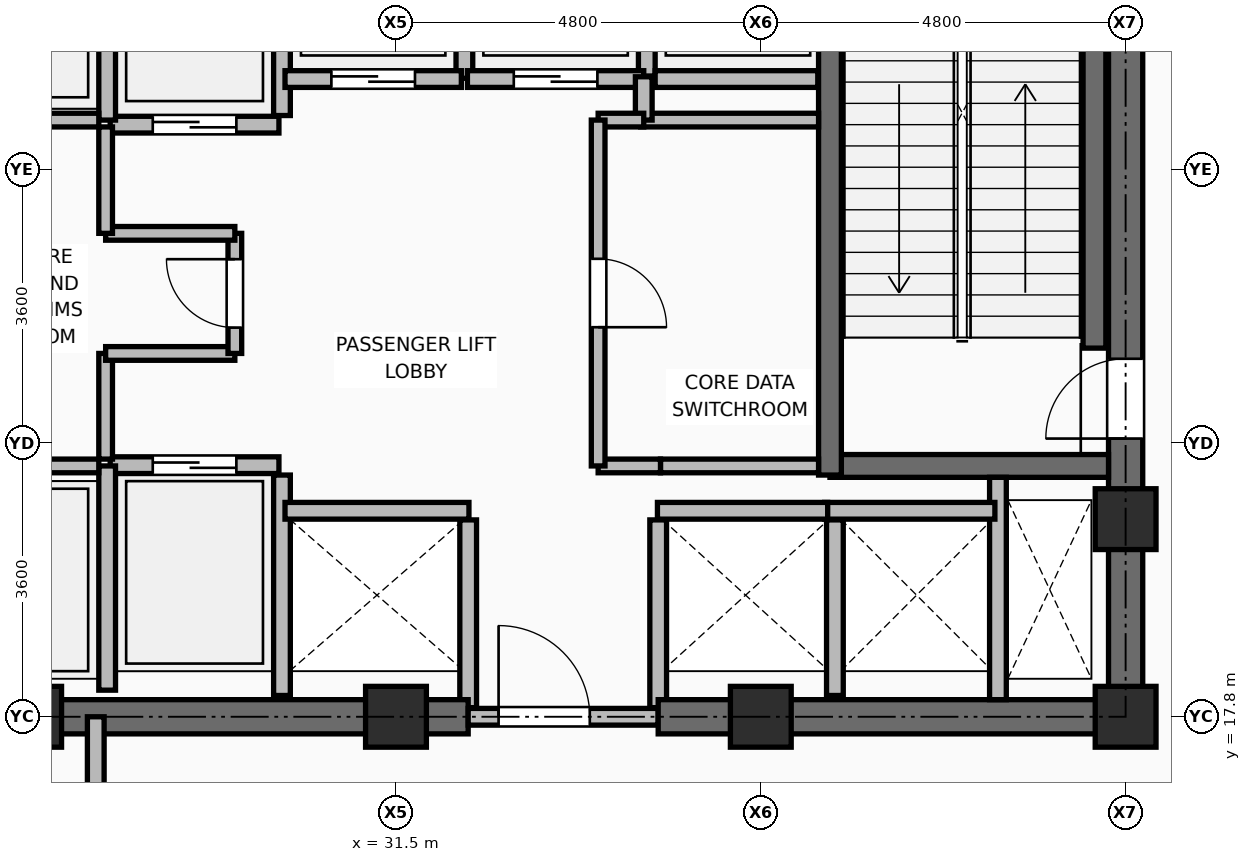
"""IFC4 building model, lengths in metres.
Left out: names, types, materials, properties, quantities, classifications, styles, units other than length and angle.
Written with IfcOpenShell. Run it as: python <this file> out.ifc"""

import sys

from ifc_helpers import new_model, si_unit, direction, frame, frame_2d, origin, origin_2d, place, context, subcontext, project, spatial, rectangle, extrude, element, fill, save


model = new_model("IFC4")
c1 = context("Model", 3, precision=1e-05, world=origin(), true_north=direction((0.0, 1.0)))
c2 = subcontext(c1, "Body", "Model", "MODEL_VIEW")
j1 = project(units=[si_unit("LENGTHUNIT", "METRE"), si_unit("PLANEANGLEUNIT", "RADIAN")], contexts=[c1])
p1 = place(None, origin())
s1 = spatial("IfcSite", under=j1, at=p1, CompositionType="ELEMENT")
p2 = place(p1, origin())
s2 = spatial("IfcBuilding", under=s1, at=p2, CompositionType="ELEMENT")
p3 = place(p2, frame((0.0, 0.0, 253.65)))
s3 = spatial("IfcBuildingStorey", under=s2, at=p3, CompositionType="ELEMENT", Elevation=253.65)
for number, where, z_axis, x_axis in (
    (1, (26.7, 17.8, 0.0), (0.0, 0.0, 1.0), (1.0, 0.0, 0.0)),
    (2, (31.5, 17.8, 0.0), (0.0, 0.0, 1.0), (1.0, 0.0, 0.0)),
    (3, (36.3, 17.8, 0.0), (0.0, 0.0, 1.0), (1.0, 0.0, 0.0)),
    (4, (41.1, 17.8, 0.0), (0.0, 0.0, 1.0), (1.0, 0.0, 0.0)),
    (5, (41.1, 20.4, 0.0), (0.0, 0.0, 1.0), (1.0, 0.0, 0.0)),
):
    element("IfcColumn", number, at=place(p3, frame(where, z_axis=z_axis, x_axis=x_axis)), inside=s3, PredefinedType="COLUMN", context=c2, shape_type="SweptSolid", body=[
        extrude(rectangle(XDim=0.8, YDim=0.8, at=origin_2d()), origin(), (0.0, 0.0, 1.0), 5.4),
    ])
p4 = place(p3, frame((30.0, 18.08, 0.0), z_axis=(0.0, 0.0, 1.0), x_axis=(0.0, 1.0, 0.0)))
e6 = element("IfcWall", 6, at=p4, inside=s3, PredefinedType="PARTITIONING", context=c2, shape_type="SweptSolid", body=[
    extrude(rectangle(XDim=2.9, YDim=0.22, at=frame_2d((1.45, 0.0))), origin(), (0.0, 0.0, 1.0), 5.195),
])
for number, where, z_axis, x_axis in (
    (7, (32.45, 17.92, 0.0), (0.0, 0.0, 1.0), (0.0, 1.0, 0.0)),
    (8, (34.95, 17.92, 0.0), (0.0, 0.0, 1.0), (0.0, 1.0, 0.0)),
):
    element("IfcWall", number, at=place(p3, frame(where, z_axis=z_axis, x_axis=x_axis)), inside=s3, PredefinedType="PARTITIONING", context=c2, shape_type="SweptSolid", body=[
        extrude(rectangle(XDim=2.47, YDim=0.22, at=frame_2d((1.235, 0.0))), origin(), (0.0, 0.0, 1.0), 5.195),
    ])
p5 = place(p3, frame((37.275, 18.08, 0.0), z_axis=(0.0, 0.0, 1.0), x_axis=(0.0, 1.0, 0.0)))
e9 = element("IfcWall", 9, at=p5, inside=s3, PredefinedType="PARTITIONING", context=c2, shape_type="SweptSolid", body=[
    extrude(rectangle(XDim=2.31, YDim=0.22, at=frame_2d((1.155, 0.0))), origin(), (0.0, 0.0, 1.0), 5.195),
])
p6 = place(p3, frame((30.0, 25.71, 0.0), z_axis=(0.0, 0.0, 1.0), x_axis=(0.0, 1.0, 0.0)))
e10 = element("IfcWall", 10, at=p6, inside=s3, PredefinedType="PARTITIONING", context=c2, shape_type="SweptSolid", body=[
    extrude(rectangle(XDim=2.73, YDim=0.22, at=frame_2d((1.365, 0.0))), origin(), (0.0, 0.0, 1.0), 5.195),
])
p7 = place(p3, frame((32.4, 26.2, 0.0), z_axis=(0.0, 0.0, 1.0), x_axis=(0.0, 1.0, 0.0)))
e11 = element("IfcWall", 11, at=p7, inside=s3, PredefinedType="PARTITIONING", context=c2, shape_type="SweptSolid", body=[
    extrude(rectangle(XDim=2.24, YDim=0.22, at=frame_2d((1.12, 0.0))), origin(), (0.0, 0.0, 1.0), 5.195),
])
p8 = place(p3, frame((34.8, 26.23, 0.0), z_axis=(0.0, 0.0, 1.0), x_axis=(0.0, 1.0, 0.0)))
e12 = element("IfcWall", 12, at=p8, inside=s3, PredefinedType="PARTITIONING", context=c2, shape_type="SweptSolid", body=[
    extrude(rectangle(XDim=2.21, YDim=0.22, at=frame_2d((1.105, 0.0))), origin(), (0.0, 0.0, 1.0), 5.195),
])
p9 = place(p3, frame((34.91, 26.19, 0.0), z_axis=(0.0, 0.0, 1.0), x_axis=(1.0, 0.0, 0.0)))
e13 = element("IfcWall", 13, at=p9, inside=s3, PredefinedType="PARTITIONING", context=c2, shape_type="SweptSolid", body=[
    extrude(rectangle(XDim=2.14, YDim=0.22, at=frame_2d((1.07, 0.0))), origin(), (0.0, 0.0, 1.0), 5.195),
])
p10 = place(p3, frame((25.55, 17.8, 0.0), z_axis=(0.0, 0.0, 1.0), x_axis=(1.0, 0.0, 0.0)))
e14 = element("IfcWall", 14, at=p10, inside=s3, PredefinedType="SHEAR", context=c2, shape_type="SweptSolid", body=[
    extrude(rectangle(XDim=6.9, YDim=0.45, at=frame_2d((3.45, 0.0))), origin(), (0.0, 0.0, 1.0), 5.22),
])
p11 = place(p3, frame((32.45, 17.8, 0.0), z_axis=(0.0, 0.0, 1.0), x_axis=(1.0, 0.0, 0.0)))
e15 = element("IfcWall", 15, at=p11, inside=s3, PredefinedType="PARTITIONING", context=c2, shape_type="SweptSolid", body=[
    extrude(rectangle(XDim=2.5, YDim=0.22, at=frame_2d((1.25, 0.0))), origin(), (0.0, 0.0, 1.0), 4.733),
])
p12 = place(p11, frame((0.4, 0.0, 0.0)))
e16 = element("IfcOpeningElement", 16, at=p12, cuts=e15, PredefinedType="OPENING", context=c2, shape_type="SweptSolid", body=[
    extrude(rectangle(XDim=1.2, YDim=2.1, at=frame_2d((0.6, 1.05))), frame((0.0, 0.12, 0.0), z_axis=(0.0, -1.0, 0.0), x_axis=(1.0, 0.0, 0.0)), (0.0, 0.0, 1.0), 0.24),
])
p13 = place(p3, frame((34.95, 17.8, 0.0), z_axis=(0.0, 0.0, 1.0), x_axis=(1.0, 0.0, 0.0)))
e17 = element("IfcWall", 17, at=p13, inside=s3, PredefinedType="SHEAR", context=c2, shape_type="SweptSolid", body=[
    extrude(rectangle(XDim=6.375, YDim=0.45, at=frame_2d((3.188, 0.0))), origin(), (0.0, 0.0, 1.0), 5.22),
])
p14 = place(p3, frame((41.1, 18.025, 0.0), z_axis=(0.0, 0.0, 1.0), x_axis=(0.0, 1.0, 0.0)))
e18 = element("IfcWall", 18, at=p14, inside=s3, PredefinedType="SHEAR", context=c2, shape_type="SweptSolid", body=[
    extrude(rectangle(XDim=14.2, YDim=0.45, at=frame_2d((7.1, 0.0))), origin(), (0.0, 0.0, 1.0), 5.22),
])
p15 = place(p14, frame((3.435, 0.0, 0.0)))
e19 = element("IfcOpeningElement", 19, at=p15, cuts=e18, PredefinedType="OPENING", context=c2, shape_type="SweptSolid", body=[
    extrude(rectangle(XDim=1.05, YDim=2.1, at=frame_2d((0.525, 1.05))), frame((0.0, 0.235, 0.0), z_axis=(0.0, -1.0, 0.0), x_axis=(1.0, 0.0, 0.0)), (0.0, 0.0, 1.0), 0.47),
])
p16 = place(p3, frame((37.21, 21.1, 0.0), z_axis=(0.0, 0.0, 1.0), x_axis=(1.0, 0.0, 0.0)))
e20 = element("IfcWall", 20, at=p16, inside=s3, PredefinedType="SHEAR", context=c2, shape_type="SweptSolid", body=[
    extrude(rectangle(XDim=3.665, YDim=0.3, at=frame_2d((1.833, 0.0))), origin(), (0.0, 0.0, 1.0), 5.22),
])
p17 = place(p3, frame((37.21, 20.98, 0.0), z_axis=(0.0, 0.0, 1.0), x_axis=(0.0, 1.0, 0.0)))
e21 = element("IfcWall", 21, at=p17, inside=s3, PredefinedType="SHEAR", context=c2, shape_type="SweptSolid", body=[
    extrude(rectangle(XDim=7.99, YDim=0.3, at=frame_2d((3.995, 0.0))), origin(), (0.0, 0.0, 1.0), 5.22),
])
p18 = place(p3, frame((40.69, 22.65, 0.0), z_axis=(0.0, 0.0, 1.0), x_axis=(0.0, 1.0, 0.0)))
e22 = element("IfcWall", 22, at=p18, inside=s3, PredefinedType="SHEAR", context=c2, shape_type="SweptSolid", body=[
    extrude(rectangle(XDim=6.2, YDim=0.3, at=frame_2d((3.1, 0.0))), origin(), (0.0, 0.0, 1.0), 5.22),
])
p19 = place(p3, frame((39.42, 18.025, 0.0), z_axis=(0.0, 0.0, 1.0), x_axis=(0.0, 1.0, 0.0)))
e23 = element("IfcWall", 23, at=p19, inside=s3, PredefinedType="PARTITIONING", context=c2, shape_type="SweptSolid", body=[
    extrude(rectangle(XDim=2.925, YDim=0.22, at=frame_2d((1.462, 0.0))), origin(), (0.0, 0.0, 1.0), 5.2),
])
p20 = place(p3, frame((27.74, 21.11, 0.0), z_axis=(0.0, 0.0, 1.0), x_axis=(1.0, 0.0, 0.0)))
e24 = element("IfcWall", 24, at=p20, inside=s3, PredefinedType="PARTITIONING", context=c2, shape_type="SweptSolid", body=[
    extrude(rectangle(XDim=2.22, YDim=0.22, at=frame_2d((1.11, 0.0))), origin(), (0.0, 0.0, 1.0), 5.2),
])
p21 = place(p20, frame((0.56, 0.0, 0.0)))
e25 = element("IfcOpeningElement", 25, at=p21, cuts=e24, PredefinedType="OPENING", context=c2, shape_type="SweptSolid", body=[
    extrude(rectangle(XDim=1.1, YDim=2.2, at=frame_2d((0.55, 1.1))), frame((0.0, 0.12, 0.0), z_axis=(0.0, -1.0, 0.0), x_axis=(1.0, 0.0, 0.0)), (0.0, 0.0, 1.0), 0.24),
])
p22 = place(p3, frame((27.74, 25.59, 0.0), z_axis=(0.0, 0.0, 1.0), x_axis=(1.0, 0.0, 0.0)))
e26 = element("IfcWall", 26, at=p22, inside=s3, PredefinedType="PARTITIONING", context=c2, shape_type="SweptSolid", body=[
    extrude(rectangle(XDim=2.22, YDim=0.22, at=frame_2d((1.11, 0.0))), origin(), (0.0, 0.0, 1.0), 5.2),
])
p23 = place(p22, frame((0.56, 0.0, 0.0)))
e27 = element("IfcOpeningElement", 27, at=p23, cuts=e26, PredefinedType="OPENING", context=c2, shape_type="SweptSolid", body=[
    extrude(rectangle(XDim=1.1, YDim=2.2, at=frame_2d((0.55, 1.1))), frame((0.0, 0.12, 0.0), z_axis=(0.0, -1.0, 0.0), x_axis=(1.0, 0.0, 0.0)), (0.0, 0.0, 1.0), 0.24),
])
p24 = place(p3, frame((30.04, 20.51, 0.0), z_axis=(0.0, 0.0, 1.0), x_axis=(1.0, 0.0, 0.0)))
e28 = element("IfcWall", 28, at=p24, inside=s3, PredefinedType="PARTITIONING", context=c2, shape_type="SweptSolid", body=[
    extrude(rectangle(XDim=2.42, YDim=0.22, at=frame_2d((1.21, 0.0))), origin(), (0.0, 0.0, 1.0), 5.2),
])
for number, where, z_axis, x_axis in (
    (29, (37.14, 20.51, 0.0), (0.0, 0.0, 1.0), (1.0, 0.0, 0.0)),
    (30, (34.94, 20.51, 0.0), (0.0, 0.0, 1.0), (1.0, 0.0, 0.0)),
):
    element("IfcWall", number, at=place(p3, frame(where, z_axis=z_axis, x_axis=x_axis)), inside=s3, PredefinedType="PARTITIONING", context=c2, shape_type="SweptSolid", body=[
        extrude(rectangle(XDim=2.24, YDim=0.22, at=frame_2d((1.12, 0.0))), origin(), (0.0, 0.0, 1.0), 5.2),
    ])
p25 = place(p3, frame((30.04, 26.19, 0.0), z_axis=(0.0, 0.0, 1.0), x_axis=(1.0, 0.0, 0.0)))
e31 = element("IfcWall", 31, at=p25, inside=s3, PredefinedType="PARTITIONING", context=c2, shape_type="SweptSolid", body=[
    extrude(rectangle(XDim=2.32, YDim=0.22, at=frame_2d((1.16, 0.0))), origin(), (0.0, 0.0, 1.0), 5.2),
])
p26 = place(p25, frame((0.61, 0.0, 0.0)))
e32 = element("IfcOpeningElement", 32, at=p26, cuts=e31, PredefinedType="OPENING", context=c2, shape_type="SweptSolid", body=[
    extrude(rectangle(XDim=1.1, YDim=2.2, at=frame_2d((0.55, 1.1))), frame((0.0, 0.12, 0.0), z_axis=(0.0, -1.0, 0.0), x_axis=(1.0, 0.0, 0.0)), (0.0, 0.0, 1.0), 0.24),
])
p27 = place(p3, frame((32.44, 26.19, 0.0), z_axis=(0.0, 0.0, 1.0), x_axis=(1.0, 0.0, 0.0)))
e33 = element("IfcWall", 33, at=p27, inside=s3, PredefinedType="PARTITIONING", context=c2, shape_type="SweptSolid", body=[
    extrude(rectangle(XDim=2.32, YDim=0.22, at=frame_2d((1.16, 0.0))), origin(), (0.0, 0.0, 1.0), 5.2),
])
p28 = place(p27, frame((0.61, 0.0, 0.0)))
e34 = element("IfcOpeningElement", 34, at=p28, cuts=e33, PredefinedType="OPENING", context=c2, shape_type="SweptSolid", body=[
    extrude(rectangle(XDim=1.1, YDim=2.2, at=frame_2d((0.55, 1.1))), frame((0.0, 0.12, 0.0), z_axis=(0.0, -1.0, 0.0), x_axis=(1.0, 0.0, 0.0)), (0.0, 0.0, 1.0), 0.24),
])
p29 = place(p3, frame((27.7, 18.15, 0.0), z_axis=(0.0, 0.0, 1.0), x_axis=(0.0, 1.0, 0.0)))
e35 = element("IfcWall", 35, at=p29, inside=s3, PredefinedType="PARTITIONING", context=c2, shape_type="SweptSolid", body=[
    extrude(rectangle(XDim=2.95, YDim=0.22, at=frame_2d((1.475, 0.0))), origin(), (0.0, 0.0, 1.0), 5.2),
])
p30 = place(p3, frame((27.7, 25.65, 0.0), z_axis=(0.0, 0.0, 1.0), x_axis=(0.0, 1.0, 0.0)))
e36 = element("IfcWall", 36, at=p30, inside=s3, PredefinedType="PARTITIONING", context=c2, shape_type="SweptSolid", body=[
    extrude(rectangle(XDim=3.0, YDim=0.22, at=frame_2d((1.5, 0.0))), origin(), (0.0, 0.0, 1.0), 5.2),
])
for number, where, z_axis, x_axis in (
    (37, (25.89, 21.1, 0.0), (0.0, 0.0, 1.0), (1.0, 0.0, 0.0)),
    (38, (25.89, 25.65, 0.0), (0.0, 0.0, 1.0), (1.0, 0.0, 0.0)),
):
    element("IfcWall", number, at=place(p3, frame(where, z_axis=z_axis, x_axis=x_axis)), inside=s3, PredefinedType="PARTITIONING", context=c2, shape_type="SweptSolid", body=[
        extrude(rectangle(XDim=1.7, YDim=0.18, at=frame_2d((0.85, 0.0))), origin(), (0.0, 0.0, 1.0), 5.2),
    ])
p31 = place(p3, frame((27.68, 21.19, 0.0), z_axis=(0.0, 0.0, 1.0), x_axis=(0.0, 1.0, 0.0)))
e39 = element("IfcWall", 39, at=p31, inside=s3, PredefinedType="PARTITIONING", context=c2, shape_type="SweptSolid", body=[
    extrude(rectangle(XDim=1.39, YDim=0.18, at=frame_2d((0.695, 0.0))), origin(), (0.0, 0.0, 1.0), 5.2),
])
p32 = place(p3, frame((27.68, 22.58, 0.0), z_axis=(0.0, 0.0, 1.0), x_axis=(1.0, 0.0, 0.0)))
e40 = element("IfcWall", 40, at=p32, inside=s3, PredefinedType="PARTITIONING", context=c2, shape_type="SweptSolid", body=[
    extrude(rectangle(XDim=1.7, YDim=0.18, at=frame_2d((0.85, 0.0))), origin(), (0.0, 0.0, 1.0), 5.2),
])
p33 = place(p3, frame((29.38, 22.58, 0.0), z_axis=(0.0, 0.0, 1.0), x_axis=(0.0, 1.0, 0.0)))
e41 = element("IfcWall", 41, at=p33, inside=s3, PredefinedType="PARTITIONING", context=c2, shape_type="SweptSolid", body=[
    extrude(rectangle(XDim=1.58, YDim=0.18, at=frame_2d((0.79, 0.0))), origin(), (0.0, 0.0, 1.0), 5.2),
])
p34 = place(p33, frame((0.34, 0.0, 0.0)))
e42 = element("IfcOpeningElement", 42, at=p34, cuts=e41, PredefinedType="OPENING", context=c2, shape_type="SweptSolid", body=[
    extrude(rectangle(XDim=0.9, YDim=2.1, at=frame_2d((0.45, 1.05))), frame((0.0, 0.1, 0.0), z_axis=(0.0, -1.0, 0.0), x_axis=(1.0, 0.0, 0.0)), (0.0, 0.0, 1.0), 0.2),
])
p35 = place(p3, frame((27.68, 24.16, 0.0), z_axis=(0.0, 0.0, 1.0), x_axis=(1.0, 0.0, 0.0)))
e43 = element("IfcWall", 43, at=p35, inside=s3, PredefinedType="PARTITIONING", context=c2, shape_type="SweptSolid", body=[
    extrude(rectangle(XDim=1.7, YDim=0.18, at=frame_2d((0.85, 0.0))), origin(), (0.0, 0.0, 1.0), 5.2),
])
p36 = place(p3, frame((27.68, 24.16, 0.0), z_axis=(0.0, 0.0, 1.0), x_axis=(0.0, 1.0, 0.0)))
e44 = element("IfcWall", 44, at=p36, inside=s3, PredefinedType="PARTITIONING", context=c2, shape_type="SweptSolid", body=[
    extrude(rectangle(XDim=1.4, YDim=0.18, at=frame_2d((0.7, 0.0))), origin(), (0.0, 0.0, 1.0), 5.2),
])
p37 = place(p3, frame((34.98, 21.1, 0.0), z_axis=(0.0, 0.0, 1.0), x_axis=(1.0, 0.0, 0.0)))
e45 = element("IfcWall", 45, at=p37, inside=s3, PredefinedType="PARTITIONING", context=c2, shape_type="SweptSolid", body=[
    extrude(rectangle(XDim=2.08, YDim=0.18, at=frame_2d((1.04, 0.0))), origin(), (0.0, 0.0, 1.0), 5.2),
])
p38 = place(p3, frame((34.72, 25.65, 0.0), z_axis=(0.0, 0.0, 1.0), x_axis=(1.0, 0.0, 0.0)))
e46 = element("IfcWall", 46, at=p38, inside=s3, PredefinedType="PARTITIONING", context=c2, shape_type="SweptSolid", body=[
    extrude(rectangle(XDim=2.34, YDim=0.18, at=frame_2d((1.17, 0.0))), origin(), (0.0, 0.0, 1.0), 5.2),
])
p39 = place(p3, frame((34.76, 25.65, 0.0), z_axis=(0.0, 0.0, 1.0), x_axis=(0.0, 1.0, 0.0)))
e47 = element("IfcWall", 47, at=p39, inside=s3, PredefinedType="PARTITIONING", context=c2, shape_type="SweptSolid", body=[
    extrude(rectangle(XDim=0.57, YDim=0.22, at=frame_2d((0.285, 0.0))), origin(), (0.0, 0.0, 1.0), 5.2),
])
p40 = place(p3, frame((34.16, 21.1, 0.0), z_axis=(0.0, 0.0, 1.0), x_axis=(1.0, 0.0, 0.0)))
e48 = element("IfcWall", 48, at=p40, inside=s3, PredefinedType="PARTITIONING", context=c2, shape_type="SweptSolid", body=[
    extrude(rectangle(XDim=0.82, YDim=0.18, at=frame_2d((0.41, 0.0))), origin(), (0.0, 0.0, 1.0), 5.2),
])
p41 = place(p3, frame((34.16, 25.65, 0.0), z_axis=(0.0, 0.0, 1.0), x_axis=(1.0, 0.0, 0.0)))
e49 = element("IfcWall", 49, at=p41, inside=s3, PredefinedType="PARTITIONING", context=c2, shape_type="SweptSolid", body=[
    extrude(rectangle(XDim=0.6, YDim=0.18, at=frame_2d((0.3, 0.0))), origin(), (0.0, 0.0, 1.0), 5.2),
])
p42 = place(p3, frame((34.16, 21.1, 0.0), z_axis=(0.0, 0.0, 1.0), x_axis=(0.0, 1.0, 0.0)))
e50 = element("IfcWall", 50, at=p42, inside=s3, PredefinedType="PARTITIONING", context=c2, shape_type="SweptSolid", body=[
    extrude(rectangle(XDim=4.55, YDim=0.18, at=frame_2d((2.275, 0.0))), origin(), (0.0, 0.0, 1.0), 5.2),
])
p43 = place(p42, frame((1.825, 0.0, 0.0)))
e51 = element("IfcOpeningElement", 51, at=p43, cuts=e50, PredefinedType="OPENING", context=c2, shape_type="SweptSolid", body=[
    extrude(rectangle(XDim=0.9, YDim=2.1, at=frame_2d((0.45, 1.05))), frame((0.0, 0.1, 0.0), z_axis=(0.0, -1.0, 0.0), x_axis=(1.0, 0.0, 0.0)), (0.0, 0.0, 1.0), 0.2),
])
p44 = place(p3, frame((27.55, 14.35, 0.0), z_axis=(0.0, 0.0, 1.0), x_axis=(0.0, 1.0, 0.0)))
e52 = element("IfcWall", 52, at=p44, inside=s3, PredefinedType="PARTITIONING", context=c2, shape_type="SweptSolid", body=[
    extrude(rectangle(XDim=3.45, YDim=0.22, at=frame_2d((1.725, 0.0))), origin(), (0.0, 0.0, 1.0), 4.733),
])
p45 = place(p44, frame((1.175, 0.0, 0.0)))
e53 = element("IfcOpeningElement", 53, at=p45, cuts=e52, PredefinedType="OPENING", context=c2, shape_type="SweptSolid", body=[
    extrude(rectangle(XDim=1.1, YDim=2.1, at=frame_2d((0.55, 1.05))), frame((0.0, 0.12, 0.0), z_axis=(0.0, -1.0, 0.0), x_axis=(1.0, 0.0, 0.0)), (0.0, 0.0, 1.0), 0.24),
])
p46 = place(p12, origin())
e54 = element("IfcDoor", 54, at=p46, inside=s3, OperationType="SINGLE_SWING_LEFT", PredefinedType="DOOR", context=c2, shape_type="SweptSolid", body=[
    extrude(rectangle(XDim=1.2, YDim=2.1, at=frame_2d((0.6, 1.05))), frame((0.0, 0.025, 0.0), z_axis=(0.0, -1.0, 0.0), x_axis=(1.0, 0.0, 0.0)), (0.0, 0.0, 1.0), 0.05),
])
fill(e16, e54)
p47 = place(p15, origin())
e55 = element("IfcDoor", 55, at=p47, inside=s3, OperationType="SINGLE_SWING_LEFT", PredefinedType="DOOR", context=c2, shape_type="SweptSolid", body=[
    extrude(rectangle(XDim=1.05, YDim=2.1, at=frame_2d((0.525, 1.05))), frame((0.0, 0.025, 0.0), z_axis=(0.0, -1.0, 0.0), x_axis=(1.0, 0.0, 0.0)), (0.0, 0.0, 1.0), 0.05),
])
fill(e19, e55)
p48 = place(p21, origin())
e56 = element("IfcDoor", 56, at=p48, inside=s3, OperationType="DOUBLE_DOOR_SLIDING", PredefinedType="DOOR", context=c2, shape_type="SweptSolid", body=[
    extrude(rectangle(XDim=1.1, YDim=2.2, at=frame_2d((0.55, 1.1))), frame((0.0, 0.025, 0.0), z_axis=(0.0, -1.0, 0.0), x_axis=(1.0, 0.0, 0.0)), (0.0, 0.0, 1.0), 0.05),
])
fill(e25, e56)
p49 = place(p23, frame((1.1, 0.0, 0.0), z_axis=(0.0, 0.0, 1.0), x_axis=(-1.0, 0.0, 0.0)))
e57 = element("IfcDoor", 57, at=p49, inside=s3, OperationType="DOUBLE_DOOR_SLIDING", PredefinedType="DOOR", context=c2, shape_type="SweptSolid", body=[
    extrude(rectangle(XDim=1.1, YDim=2.2, at=frame_2d((0.55, 1.1))), frame((0.0, 0.025, 0.0), z_axis=(0.0, -1.0, 0.0), x_axis=(1.0, 0.0, 0.0)), (0.0, 0.0, 1.0), 0.05),
])
fill(e27, e57)
p50 = place(p26, frame((1.1, 0.0, 0.0), z_axis=(0.0, 0.0, 1.0), x_axis=(-1.0, 0.0, 0.0)))
e58 = element("IfcDoor", 58, at=p50, inside=s3, OperationType="DOUBLE_DOOR_SLIDING", PredefinedType="DOOR", context=c2, shape_type="SweptSolid", body=[
    extrude(rectangle(XDim=1.1, YDim=2.2, at=frame_2d((0.55, 1.1))), frame((0.0, 0.025, 0.0), z_axis=(0.0, -1.0, 0.0), x_axis=(1.0, 0.0, 0.0)), (0.0, 0.0, 1.0), 0.05),
])
fill(e32, e58)
p51 = place(p28, frame((1.1, 0.0, 0.0), z_axis=(0.0, 0.0, 1.0), x_axis=(-1.0, 0.0, 0.0)))
e59 = element("IfcDoor", 59, at=p51, inside=s3, OperationType="DOUBLE_DOOR_SLIDING", PredefinedType="DOOR", context=c2, shape_type="SweptSolid", body=[
    extrude(rectangle(XDim=1.1, YDim=2.2, at=frame_2d((0.55, 1.1))), frame((0.0, 0.025, 0.0), z_axis=(0.0, -1.0, 0.0), x_axis=(1.0, 0.0, 0.0)), (0.0, 0.0, 1.0), 0.05),
])
fill(e34, e59)
p52 = place(p34, origin())
e60 = element("IfcDoor", 60, at=p52, inside=s3, OperationType="SINGLE_SWING_RIGHT", PredefinedType="DOOR", context=c2, shape_type="SweptSolid", body=[
    extrude(rectangle(XDim=0.9, YDim=2.1, at=frame_2d((0.45, 1.05))), frame((0.0, 0.025, 0.0), z_axis=(0.0, -1.0, 0.0), x_axis=(1.0, 0.0, 0.0)), (0.0, 0.0, 1.0), 0.05),
])
fill(e42, e60)
p53 = place(p43, frame((0.9, 0.0, 0.0), z_axis=(0.0, 0.0, 1.0), x_axis=(-1.0, 0.0, 0.0)))
e61 = element("IfcDoor", 61, at=p53, inside=s3, OperationType="SINGLE_SWING_RIGHT", PredefinedType="DOOR", context=c2, shape_type="SweptSolid", body=[
    extrude(rectangle(XDim=0.9, YDim=2.1, at=frame_2d((0.45, 1.05))), frame((0.0, 0.025, 0.0), z_axis=(0.0, -1.0, 0.0), x_axis=(1.0, 0.0, 0.0)), (0.0, 0.0, 1.0), 0.05),
])
fill(e51, e61)
save(model, sys.argv[1])
